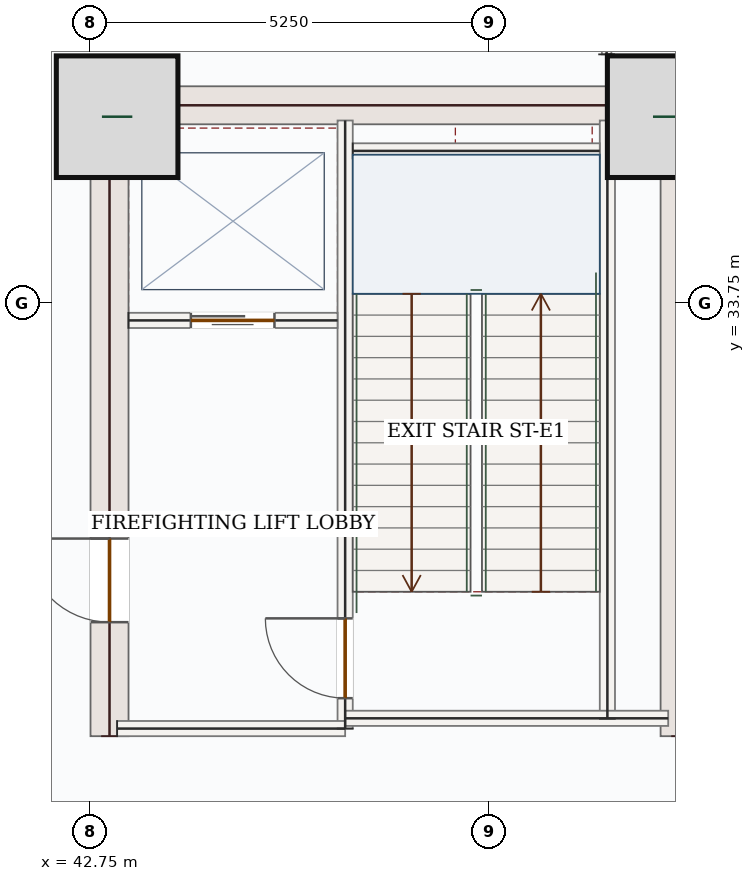
"""IFC4 building model, lengths in metres.
Left out: names, types, materials, properties, quantities, classifications, styles, units other than length and angle.
Written with IfcOpenShell. Run it as: python <this file> out.ifc"""

import sys

from ifc_helpers import new_model, si_unit, direction, frame, frame_2d, origin, origin_2d, place, context, subcontext, project, spatial, rectangle, extrude, source, transform, mapped, element, fill, save


model = new_model("IFC4")
c1 = context("Model", 3, precision=1e-05, world=origin(), true_north=direction((0.0, 1.0)))
c2 = subcontext(c1, "Body", "Model", "MODEL_VIEW")
j1 = project(units=[si_unit("LENGTHUNIT", "METRE"), si_unit("PLANEANGLEUNIT", "RADIAN")], contexts=[c1])
p1 = place(None, origin())
s1 = spatial("IfcSite", under=j1, at=p1, CompositionType="ELEMENT")
p2 = place(p1, origin())
s2 = spatial("IfcBuilding", under=s1, at=p2, CompositionType="ELEMENT")
p3 = place(p2, frame((0.0, 0.0, 7.2)))
s3 = spatial("IfcBuildingStorey", under=s2, at=p3, CompositionType="ELEMENT", Elevation=7.2)
p4 = place(p3, frame((43.0, 28.05, 0.0), z_axis=(0.0, 0.0, 1.0), x_axis=(0.0, 1.0, 0.0)))
e1 = element("IfcWall", 1, at=p4, inside=s3, PredefinedType="SHEAR", context=c2, shape_type="SweptSolid", body=[
    extrude(rectangle(XDim=8.55, YDim=0.5, at=frame_2d((4.275, 0.0))), origin(), (0.0, 0.0, 1.0), 5.1),
])
p5 = place(p4, frame((1.5, 0.0, 0.0)))
e2 = element("IfcOpeningElement", 2, at=p5, cuts=e1, PredefinedType="OPENING", context=c2, shape_type="SweptSolid", body=[
    extrude(rectangle(XDim=1.1, YDim=2.2, at=frame_2d((0.55, 1.1))), frame((0.0, 0.26, 0.0), z_axis=(0.0, -1.0, 0.0), x_axis=(1.0, 0.0, 0.0)), (0.0, 0.0, 1.0), 0.52),
])
m1 = source(origin(), c2, "Body", "SweptSolid", [
    extrude(rectangle(XDim=8.55, YDim=0.5, at=frame_2d((4.275, 0.0))), origin(), (0.0, 0.0, 1.0), 5.1),
])
p6 = place(p3, frame((50.5, 28.05, 0.0), z_axis=(0.0, 0.0, 1.0), x_axis=(0.0, 1.0, 0.0)))
e3 = element("IfcWall", 3, at=p6, inside=s3, PredefinedType="SHEAR", context=c2, shape_type="MappedRepresentation", body=[
    mapped(m1, transform((0.0, 0.0, 0.0), x_axis=(1.0, 0.0, 0.0), y_axis=(0.0, 1.0, 0.0), z_axis=(0.0, 0.0, 1.0), scale=1.0)),
])
m2 = source(origin(), c2, "Body", "SweptSolid", [
    extrude(rectangle(XDim=7.0, YDim=0.5, at=frame_2d((3.5, 0.0))), origin(), (0.0, 0.0, 1.0), 5.1),
])
p7 = place(p3, frame((43.25, 36.35, 0.0), z_axis=(0.0, 0.0, 1.0), x_axis=(1.0, 0.0, 0.0)))
e4 = element("IfcWall", 4, at=p7, inside=s3, PredefinedType="SHEAR", context=c2, shape_type="MappedRepresentation", body=[
    mapped(m2, transform((0.0, 0.0, 0.0), x_axis=(1.0, 0.0, 0.0), y_axis=(0.0, 1.0, 0.0), z_axis=(0.0, 0.0, 1.0), scale=1.0)),
])
m3 = source(origin(), c2, "Body", "SweptSolid", [
    extrude(rectangle(XDim=1.6, YDim=1.6, at=origin_2d()), origin(), (0.0, 0.0, 1.0), 5.4),
])
for number, where, z_axis, x_axis in (
    (5, (43.1, 36.2, 0.0), (0.0, 0.0, 1.0), (1.0, 0.0, 0.0)),
    (6, (50.35, 36.2, 0.0), (0.0, 0.0, 1.0), (1.0, 0.0, 0.0)),
):
    element("IfcColumn", number, at=place(p3, frame(where, z_axis=z_axis, x_axis=x_axis)), inside=s3, PredefinedType="COLUMN", context=c2, shape_type="MappedRepresentation", body=[
        mapped(m3, transform((0.0, 0.0, 0.0), x_axis=(1.0, 0.0, 0.0), y_axis=(0.0, 1.0, 0.0), z_axis=(0.0, 0.0, 1.0), scale=1.0)),
    ])
m4 = source(origin(), c2, "Body", "SweptSolid", [
    extrude(rectangle(XDim=7.87, YDim=0.2, at=frame_2d((3.935, 0.0))), origin(), (0.0, 0.0, 1.0), 5.1),
])
p8 = place(p3, frame((49.55, 28.28, 0.0), z_axis=(0.0, 0.0, 1.0), x_axis=(0.0, 1.0, 0.0)))
e7 = element("IfcWall", 7, at=p8, inside=s3, PredefinedType="SOLIDWALL", context=c2, shape_type="MappedRepresentation", body=[
    mapped(m4, transform((0.0, 0.0, 0.0), x_axis=(1.0, 0.0, 0.0), y_axis=(0.0, 1.0, 0.0), z_axis=(0.0, 0.0, 1.0), scale=1.0)),
])
p9 = place(p3, frame((46.1, 28.15, 0.0), z_axis=(0.0, 0.0, 1.0), x_axis=(0.0, 1.0, 0.0)))
e8 = element("IfcWall", 8, at=p9, inside=s3, PredefinedType="SOLIDWALL", context=c2, shape_type="SweptSolid", body=[
    extrude(rectangle(XDim=8.0, YDim=0.2, at=frame_2d((4.0, 0.0))), origin(), (0.0, 0.0, 1.0), 5.1),
])
p10 = place(p9, frame((0.4, 0.0, 0.0)))
e9 = element("IfcOpeningElement", 9, at=p10, cuts=e8, PredefinedType="OPENING", context=c2, shape_type="SweptSolid", body=[
    extrude(rectangle(XDim=1.05, YDim=2.15, at=frame_2d((0.525, 1.075))), frame((0.0, 0.11, 0.0), z_axis=(0.0, -1.0, 0.0), x_axis=(1.0, 0.0, 0.0)), (0.0, 0.0, 1.0), 0.22),
])
m5 = source(origin(), c2, "Body", "SweptSolid", [
    extrude(rectangle(XDim=3.0, YDim=0.2, at=frame_2d((1.5, 0.0))), origin(), (0.0, 0.0, 1.0), 5.1),
])
p11 = place(p3, frame((43.1, 28.15, 0.0), z_axis=(0.0, 0.0, 1.0), x_axis=(1.0, 0.0, 0.0)))
e10 = element("IfcWall", 10, at=p11, inside=s3, PredefinedType="SOLIDWALL", context=c2, shape_type="MappedRepresentation", body=[
    mapped(m5, transform((0.0, 0.0, 0.0), x_axis=(1.0, 0.0, 0.0), y_axis=(0.0, 1.0, 0.0), z_axis=(0.0, 0.0, 1.0), scale=1.0)),
])
m6 = source(origin(), c2, "Body", "SweptSolid", [
    extrude(rectangle(XDim=4.25, YDim=0.2, at=frame_2d((2.125, 0.0))), origin(), (0.0, 0.0, 1.0), 5.1),
])
p12 = place(p3, frame((46.1, 28.285, 0.0), z_axis=(0.0, 0.0, 1.0), x_axis=(1.0, 0.0, 0.0)))
e11 = element("IfcWall", 11, at=p12, inside=s3, PredefinedType="SOLIDWALL", context=c2, shape_type="MappedRepresentation", body=[
    mapped(m6, transform((0.0, 0.0, 0.0), x_axis=(1.0, 0.0, 0.0), y_axis=(0.0, 1.0, 0.0), z_axis=(0.0, 0.0, 1.0), scale=1.0)),
])
m7 = source(origin(), c2, "Body", "SweptSolid", [
    extrude(rectangle(XDim=3.25, YDim=0.2, at=frame_2d((1.625, 0.0))), origin(), (0.0, 0.0, 1.0), 5.1),
])
p13 = place(p3, frame((46.2, 35.75, 0.0), z_axis=(0.0, 0.0, 1.0), x_axis=(1.0, 0.0, 0.0)))
e12 = element("IfcWall", 12, at=p13, inside=s3, PredefinedType="SOLIDWALL", context=c2, shape_type="MappedRepresentation", body=[
    mapped(m7, transform((0.0, 0.0, 0.0), x_axis=(1.0, 0.0, 0.0), y_axis=(0.0, 1.0, 0.0), z_axis=(0.0, 0.0, 1.0), scale=1.0)),
])
p14 = place(p3, frame((43.25, 33.52, 0.0), z_axis=(0.0, 0.0, 1.0), x_axis=(1.0, 0.0, 0.0)))
e13 = element("IfcWall", 13, at=p14, inside=s3, PredefinedType="SOLIDWALL", context=c2, shape_type="SweptSolid", body=[
    extrude(rectangle(XDim=2.75, YDim=0.2, at=frame_2d((1.375, 0.0))), origin(), (0.0, 0.0, 1.0), 5.1),
])
p15 = place(p14, frame((0.82, 0.0, 0.0)))
e14 = element("IfcOpeningElement", 14, at=p15, cuts=e13, PredefinedType="OPENING", context=c2, shape_type="SweptSolid", body=[
    extrude(rectangle(XDim=1.1, YDim=2.15, at=frame_2d((0.55, 1.075))), frame((0.0, 0.11, 0.0), z_axis=(0.0, -1.0, 0.0), x_axis=(1.0, 0.0, 0.0)), (0.0, 0.0, 1.0), 0.22),
])
m8 = source(origin(), c2, "Body", "SweptSolid", [
    extrude(rectangle(XDim=1.832, YDim=0.125, at=frame_2d((0.916, 0.0))), origin(), (0.0, 0.0, 1.0), 5.1),
])
p16 = place(p3, frame((49.54, 37.02, 0.0), z_axis=(0.0, 0.0, 1.0), x_axis=(-0.000133244502, 0.999999991123, 0.0)))
e15 = element("IfcWall", 15, at=p16, inside=s3, PredefinedType="PARTITIONING", context=c2, shape_type="MappedRepresentation", body=[
    mapped(m8, transform((0.0, 0.0, 0.0), x_axis=(1.0, 0.0, 0.0), y_axis=(0.0, 1.0, 0.0), z_axis=(0.0, 0.0, 1.0), scale=1.0)),
])
m9 = source(origin(), c2, "Body", "SweptSolid", [
    extrude(rectangle(XDim=1.05, YDim=2.15, at=frame_2d((0.525, 1.075))), frame((0.0, 0.025, 0.0), z_axis=(0.0, -1.0, 0.0), x_axis=(1.0, 0.0, 0.0)), (0.0, 0.0, 1.0), 0.05),
])
p17 = place(p10, origin())
e16 = element("IfcDoor", 16, at=p17, inside=s3, OperationType="SINGLE_SWING_RIGHT", PredefinedType="DOOR", context=c2, shape_type="MappedRepresentation", body=[
    mapped(m9, transform((0.0, 0.0, 0.0), x_axis=(1.0, 0.0, 0.0), y_axis=(0.0, 1.0, 0.0), z_axis=(0.0, 0.0, 1.0), scale=1.0)),
])
fill(e9, e16)
m10 = source(origin(), c2, "Body", "SweptSolid", [
    extrude(rectangle(XDim=1.1, YDim=2.15, at=frame_2d((0.55, 1.075))), frame((0.0, 0.025, 0.0), z_axis=(0.0, -1.0, 0.0), x_axis=(1.0, 0.0, 0.0)), (0.0, 0.0, 1.0), 0.05),
])
p18 = place(p15, origin())
e17 = element("IfcDoor", 17, at=p18, inside=s3, OperationType="DOUBLE_DOOR_SLIDING", PredefinedType="DOOR", context=c2, shape_type="MappedRepresentation", body=[
    mapped(m10, transform((0.0, 0.0, 0.0), x_axis=(1.0, 0.0, 0.0), y_axis=(0.0, 1.0, 0.0), z_axis=(0.0, 0.0, 1.0), scale=1.0)),
])
fill(e14, e17)
m11 = source(origin(), c2, "Body", "SweptSolid", [
    extrude(rectangle(XDim=1.1, YDim=2.2, at=frame_2d((0.55, 1.1))), frame((0.0, 0.025, 0.0), z_axis=(0.0, -1.0, 0.0), x_axis=(1.0, 0.0, 0.0)), (0.0, 0.0, 1.0), 0.05),
])
p19 = place(p5, origin())
e18 = element("IfcDoor", 18, at=p19, inside=s3, OperationType="SINGLE_SWING_RIGHT", PredefinedType="DOOR", context=c2, shape_type="MappedRepresentation", body=[
    mapped(m11, transform((0.0, 0.0, 0.0), x_axis=(1.0, 0.0, 0.0), y_axis=(0.0, 1.0, 0.0), z_axis=(0.0, 0.0, 1.0), scale=1.0)),
])
fill(e2, e18)
save(model, sys.argv[1])
